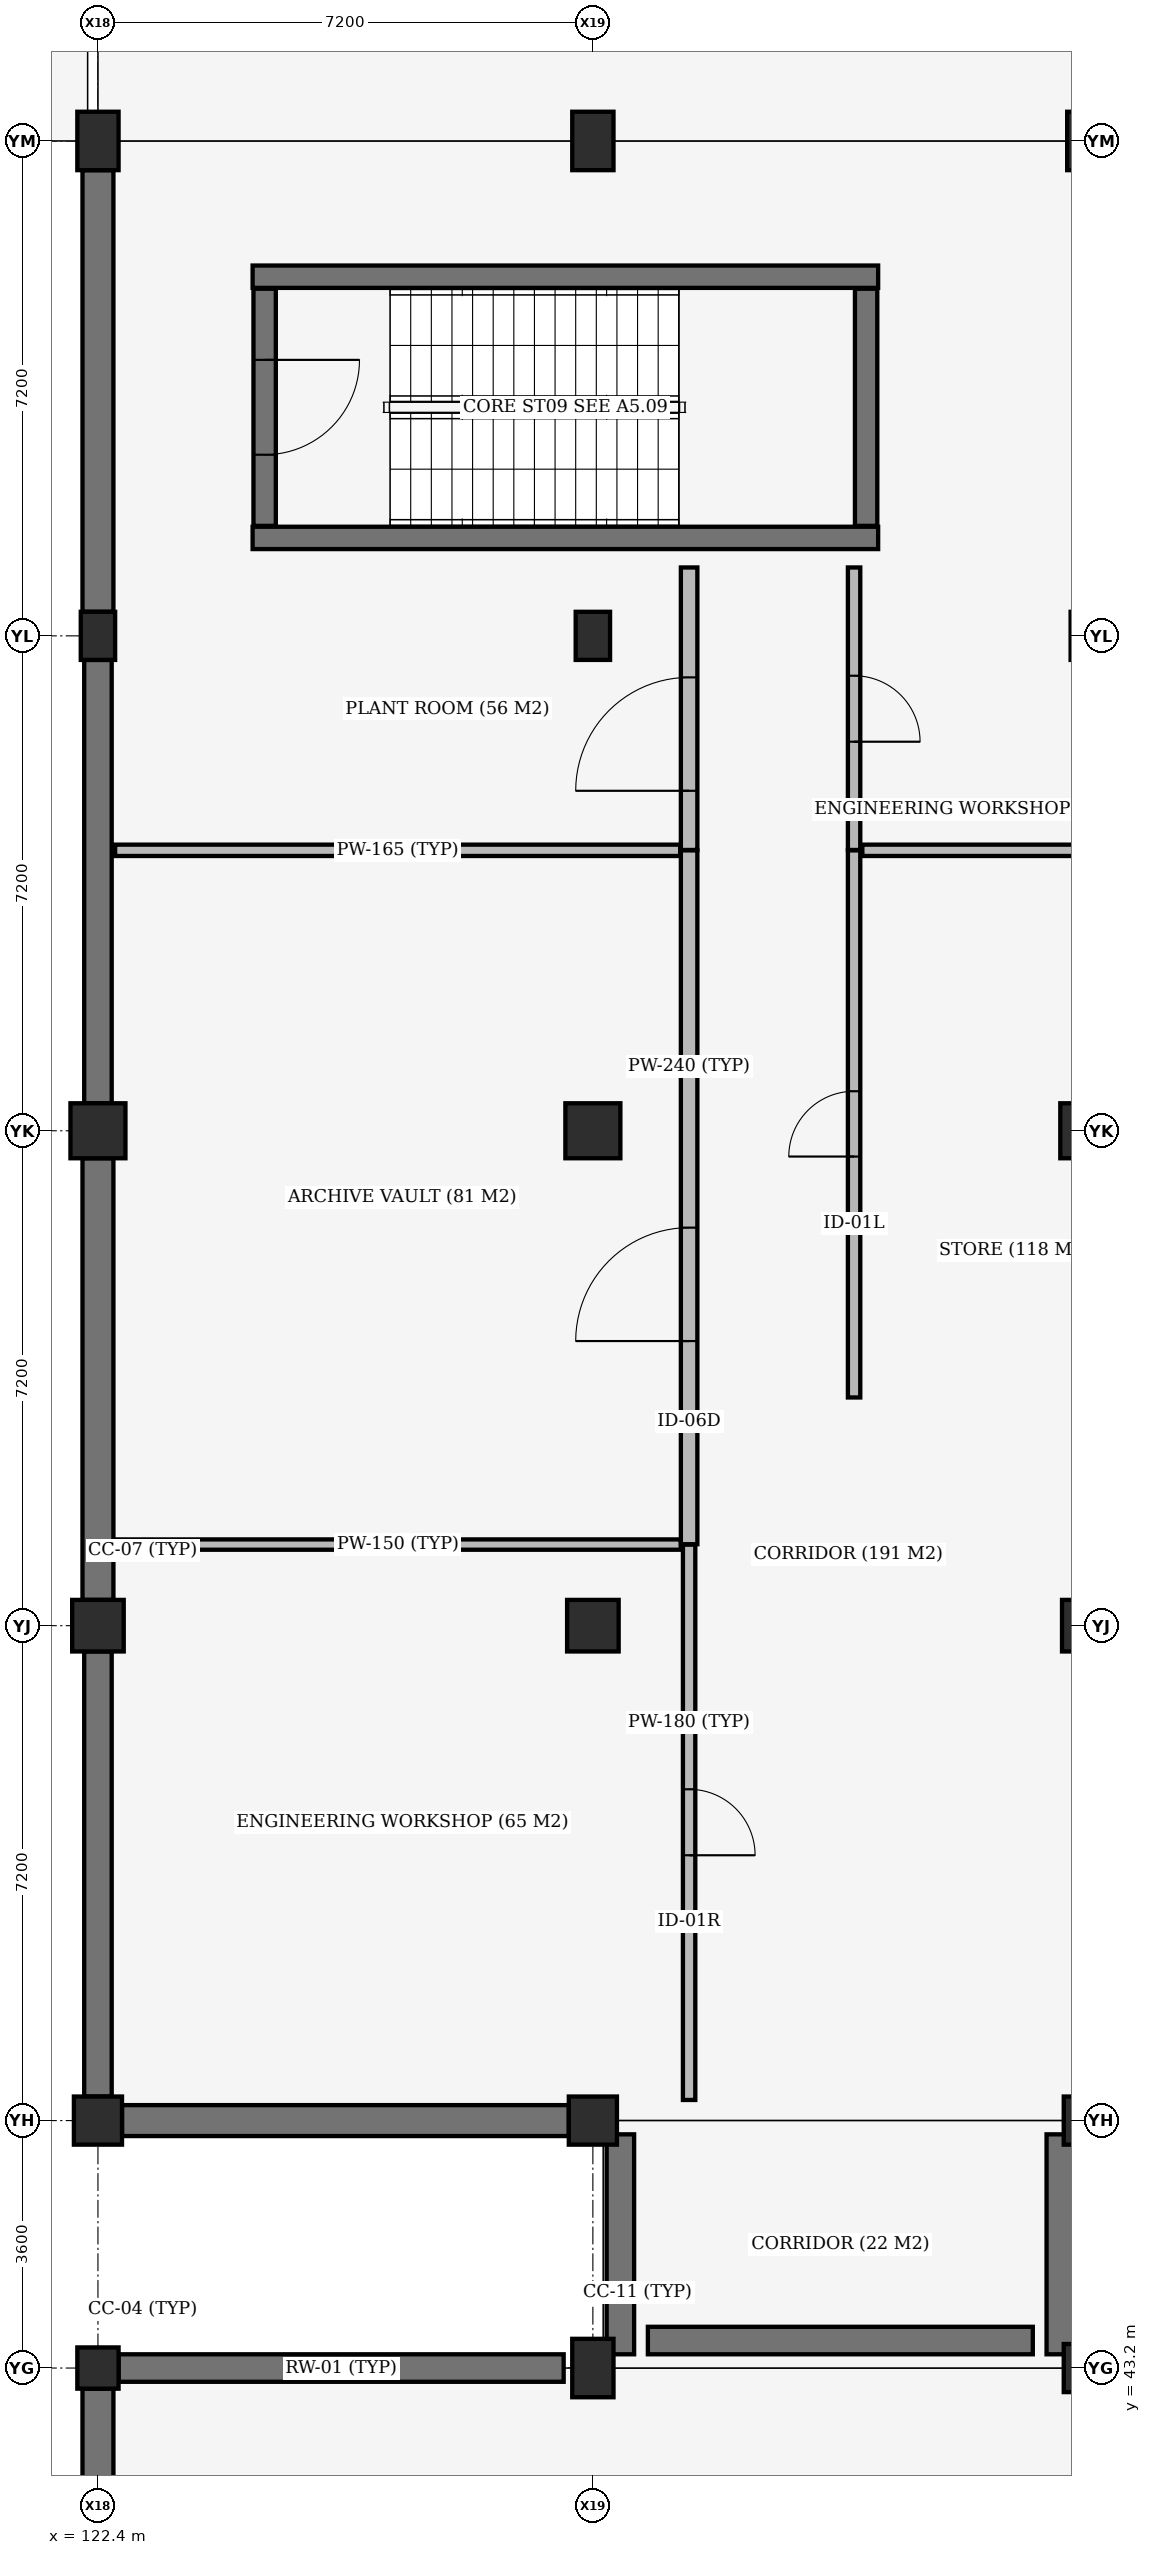
"""IFC4 building model, lengths in metres.
Left out: names, types, materials, properties, quantities, classifications, styles, units other than length and angle.
Written with IfcOpenShell. Run it as: python <this file> out.ifc"""

import sys

from ifc_helpers import new_model, si_unit, direction, frame, frame_2d, origin, origin_2d, place, context, subcontext, project, spatial, rectangle, extrude, element, fill, save


model = new_model("IFC4")
c1 = context("Model", 3, precision=1e-05, world=origin(), true_north=direction((0.0, 1.0)))
c2 = subcontext(c1, "Body", "Model", "MODEL_VIEW")
j1 = project(units=[si_unit("LENGTHUNIT", "METRE"), si_unit("PLANEANGLEUNIT", "RADIAN")], contexts=[c1])
p1 = place(None, origin())
s1 = spatial("IfcSite", under=j1, at=p1, CompositionType="ELEMENT")
p2 = place(p1, origin())
s2 = spatial("IfcBuilding", under=s1, at=p2, CompositionType="ELEMENT")
p3 = place(p2, frame((0.0, 0.0, -4.5)))
s3 = spatial("IfcBuildingStorey", under=s2, at=p3, CompositionType="ELEMENT", Elevation=-4.5)
p4 = place(p3, frame((122.4, 43.2, -0.42), z_axis=(0.0, 0.0, 1.0), x_axis=(1.0, 0.0, 0.0)))
e1 = element("IfcColumn", 1, at=p4, inside=s3, PredefinedType="COLUMN", context=c2, shape_type="SweptSolid", body=[
    extrude(rectangle(XDim=0.6, YDim=0.6, at=origin_2d()), origin(), (0.0, 0.0, 1.0), 4.6),
])
p5 = place(p3, frame((129.6, 43.2, -0.42), z_axis=(0.0, 0.0, 1.0), x_axis=(1.0, 0.0, 0.0)))
e2 = element("IfcColumn", 2, at=p5, inside=s3, PredefinedType="COLUMN", context=c2, shape_type="SweptSolid", body=[
    extrude(rectangle(XDim=0.6, YDim=0.85, at=origin_2d()), origin(), (0.0, 0.0, 1.0), 4.6),
])
for number, where, z_axis, x_axis in (
    (3, (136.8, 43.2, -0.42), (0.0, 0.0, 1.0), (1.0, 0.0, 0.0)),
    (4, (122.4, 46.8, -0.42), (0.0, 0.0, 1.0), (1.0, 0.0, 0.0)),
):
    element("IfcColumn", number, at=place(p3, frame(where, z_axis=z_axis, x_axis=x_axis)), inside=s3, PredefinedType="COLUMN", context=c2, shape_type="SweptSolid", body=[
        extrude(rectangle(XDim=0.7, YDim=0.7, at=origin_2d()), origin(), (0.0, 0.0, 1.0), 4.6),
    ])
p6 = place(p3, frame((122.4, 54.0, -0.42), z_axis=(0.0, 0.0, 1.0), x_axis=(1.0, 0.0, 0.0)))
e5 = element("IfcColumn", 5, at=p6, inside=s3, PredefinedType="COLUMN", context=c2, shape_type="SweptSolid", body=[
    extrude(rectangle(XDim=0.75, YDim=0.75, at=origin_2d()), origin(), (0.0, 0.0, 1.0), 4.6),
])
p7 = place(p3, frame((122.4, 61.2, -0.42), z_axis=(0.0, 0.0, 1.0), x_axis=(1.0, 0.0, 0.0)))
e6 = element("IfcColumn", 6, at=p7, inside=s3, PredefinedType="COLUMN", context=c2, shape_type="SweptSolid", body=[
    extrude(rectangle(XDim=0.8, YDim=0.8, at=origin_2d()), origin(), (0.0, 0.0, 1.0), 4.6),
])
p8 = place(p3, frame((122.4, 68.4, -0.42), z_axis=(0.0, 0.0, 1.0), x_axis=(1.0, 0.0, 0.0)))
e7 = element("IfcColumn", 7, at=p8, inside=s3, PredefinedType="COLUMN", context=c2, shape_type="SweptSolid", body=[
    extrude(rectangle(XDim=0.5, YDim=0.7, at=origin_2d()), origin(), (0.0, 0.0, 1.0), 4.6),
])
p9 = place(p3, frame((122.4, 75.6, -0.42), z_axis=(0.0, 0.0, 1.0), x_axis=(1.0, 0.0, 0.0)))
e8 = element("IfcColumn", 8, at=p9, inside=s3, PredefinedType="COLUMN", context=c2, shape_type="SweptSolid", body=[
    extrude(rectangle(XDim=0.6, YDim=0.85, at=origin_2d()), origin(), (0.0, 0.0, 1.0), 4.6),
])
p10 = place(p3, frame((129.6, 46.8, -0.42), z_axis=(0.0, 0.0, 1.0), x_axis=(1.0, 0.0, 0.0)))
e9 = element("IfcColumn", 9, at=p10, inside=s3, PredefinedType="COLUMN", context=c2, shape_type="SweptSolid", body=[
    extrude(rectangle(XDim=0.7, YDim=0.7, at=origin_2d()), origin(), (0.0, 0.0, 1.0), 4.6),
])
p11 = place(p3, frame((129.6, 54.0, -0.42), z_axis=(0.0, 0.0, 1.0), x_axis=(1.0, 0.0, 0.0)))
e10 = element("IfcColumn", 10, at=p11, inside=s3, PredefinedType="COLUMN", context=c2, shape_type="SweptSolid", body=[
    extrude(rectangle(XDim=0.75, YDim=0.75, at=origin_2d()), origin(), (0.0, 0.0, 1.0), 4.6),
])
p12 = place(p3, frame((129.6, 61.2, -0.42), z_axis=(0.0, 0.0, 1.0), x_axis=(1.0, 0.0, 0.0)))
e11 = element("IfcColumn", 11, at=p12, inside=s3, PredefinedType="COLUMN", context=c2, shape_type="SweptSolid", body=[
    extrude(rectangle(XDim=0.8, YDim=0.8, at=origin_2d()), origin(), (0.0, 0.0, 1.0), 4.6),
])
p13 = place(p3, frame((129.6, 68.4, -0.42), z_axis=(0.0, 0.0, 1.0), x_axis=(1.0, 0.0, 0.0)))
e12 = element("IfcColumn", 12, at=p13, inside=s3, PredefinedType="COLUMN", context=c2, shape_type="SweptSolid", body=[
    extrude(rectangle(XDim=0.5, YDim=0.7, at=origin_2d()), origin(), (0.0, 0.0, 1.0), 4.6),
])
p14 = place(p3, frame((129.6, 75.6, -0.42), z_axis=(0.0, 0.0, 1.0), x_axis=(1.0, 0.0, 0.0)))
e13 = element("IfcColumn", 13, at=p14, inside=s3, PredefinedType="COLUMN", context=c2, shape_type="SweptSolid", body=[
    extrude(rectangle(XDim=0.6, YDim=0.85, at=origin_2d()), origin(), (0.0, 0.0, 1.0), 4.6),
])
p15 = place(p3, frame((136.8, 46.8, -0.42), z_axis=(0.0, 0.0, 1.0), x_axis=(1.0, 0.0, 0.0)))
e14 = element("IfcColumn", 14, at=p15, inside=s3, PredefinedType="COLUMN", context=c2, shape_type="SweptSolid", body=[
    extrude(rectangle(XDim=0.7, YDim=0.7, at=origin_2d()), origin(), (0.0, 0.0, 1.0), 4.6),
])
p16 = place(p3, frame((136.8, 54.0, -0.42), z_axis=(0.0, 0.0, 1.0), x_axis=(1.0, 0.0, 0.0)))
e15 = element("IfcColumn", 15, at=p16, inside=s3, PredefinedType="COLUMN", context=c2, shape_type="SweptSolid", body=[
    extrude(rectangle(XDim=0.75, YDim=0.75, at=origin_2d()), origin(), (0.0, 0.0, 1.0), 4.6),
])
p17 = place(p3, frame((136.8, 61.2, -0.42), z_axis=(0.0, 0.0, 1.0), x_axis=(1.0, 0.0, 0.0)))
e16 = element("IfcColumn", 16, at=p17, inside=s3, PredefinedType="COLUMN", context=c2, shape_type="SweptSolid", body=[
    extrude(rectangle(XDim=0.8, YDim=0.8, at=origin_2d()), origin(), (0.0, 0.0, 1.0), 4.6),
])
p18 = place(p3, frame((136.8, 75.6, -0.42), z_axis=(0.0, 0.0, 1.0), x_axis=(1.0, 0.0, 0.0)))
e17 = element("IfcColumn", 17, at=p18, inside=s3, PredefinedType="COLUMN", context=c2, shape_type="SweptSolid", body=[
    extrude(rectangle(XDim=0.6, YDim=0.85, at=origin_2d()), origin(), (0.0, 0.0, 1.0), 4.6),
])
for number, where, z_axis, x_axis in (
    (18, (124.65, 69.825, 0.0), (0.0, 0.0, 1.0), (1.0, 0.0, 0.0)),
    (19, (133.75, 73.625, 0.0), (0.0, 0.0, 1.0), (-1.0, 0.0, 0.0)),
):
    element("IfcWall", number, at=place(p3, frame(where, z_axis=z_axis, x_axis=x_axis)), inside=s3, PredefinedType="SHEAR", context=c2, shape_type="SweptSolid", body=[
        extrude(rectangle(XDim=9.1, YDim=0.325, at=frame_2d((4.55, 0.0))), origin(), (0.0, 0.0, 1.0), 4.18),
    ])
p19 = place(p3, frame((133.575, 70.0, 0.0), z_axis=(0.0, 0.0, 1.0), x_axis=(0.0, 1.0, 0.0)))
e20 = element("IfcWall", 20, at=p19, inside=s3, PredefinedType="SHEAR", context=c2, shape_type="SweptSolid", body=[
    extrude(rectangle(XDim=3.45, YDim=0.325, at=frame_2d((1.725, 0.0))), origin(), (0.0, 0.0, 1.0), 4.18),
])
p20 = place(p3, frame((122.7, 43.2, 0.0), z_axis=(0.0, 0.0, 1.0), x_axis=(1.0, 0.0, 0.0)))
e21 = element("IfcWall", 21, at=p20, inside=s3, PredefinedType="USERDEFINED", context=c2, shape_type="SweptSolid", body=[
    extrude(rectangle(XDim=6.475, YDim=0.4, at=frame_2d((3.238, 0.0))), origin(), (0.0, 0.0, 1.0), 4.18),
])
p21 = place(p3, frame((122.4, 36.275, 0.0), z_axis=(0.0, 0.0, 1.0), x_axis=(0.0, 1.0, 0.0)))
e22 = element("IfcWall", 22, at=p21, inside=s3, PredefinedType="USERDEFINED", context=c2, shape_type="SweptSolid", body=[
    extrude(rectangle(XDim=6.625, YDim=0.45, at=frame_2d((3.312, 0.0))), origin(), (0.0, 0.0, 1.0), 4.18),
])
p22 = place(p3, frame((122.75, 46.8, 0.0), z_axis=(0.0, 0.0, 1.0), x_axis=(1.0, 0.0, 0.0)))
e23 = element("IfcWall", 23, at=p22, inside=s3, PredefinedType="USERDEFINED", context=c2, shape_type="SweptSolid", body=[
    extrude(rectangle(XDim=6.5, YDim=0.45, at=frame_2d((3.25, 0.0))), origin(), (0.0, 0.0, 1.0), 4.18),
])
p23 = place(p3, frame((122.4, 47.15, 0.0), z_axis=(0.0, 0.0, 1.0), x_axis=(0.0, 1.0, 0.0)))
e24 = element("IfcWall", 24, at=p23, inside=s3, PredefinedType="USERDEFINED", context=c2, shape_type="SweptSolid", body=[
    extrude(rectangle(XDim=6.475, YDim=0.4, at=frame_2d((3.238, 0.0))), origin(), (0.0, 0.0, 1.0), 4.18),
])
p24 = place(p3, frame((122.4, 54.375, 0.0), z_axis=(0.0, 0.0, 1.0), x_axis=(0.0, 1.0, 0.0)))
e25 = element("IfcWall", 25, at=p24, inside=s3, PredefinedType="USERDEFINED", context=c2, shape_type="SweptSolid", body=[
    extrude(rectangle(XDim=6.425, YDim=0.45, at=frame_2d((3.212, 0.0))), origin(), (0.0, 0.0, 1.0), 4.18),
])
p25 = place(p3, frame((122.4, 61.6, 0.0), z_axis=(0.0, 0.0, 1.0), x_axis=(0.0, 1.0, 0.0)))
e26 = element("IfcWall", 26, at=p25, inside=s3, PredefinedType="USERDEFINED", context=c2, shape_type="SweptSolid", body=[
    extrude(rectangle(XDim=6.45, YDim=0.4, at=frame_2d((3.225, 0.0))), origin(), (0.0, 0.0, 1.0), 4.18),
])
p26 = place(p3, frame((122.4, 68.75, 0.0), z_axis=(0.0, 0.0, 1.0), x_axis=(0.0, 1.0, 0.0)))
e27 = element("IfcWall", 27, at=p26, inside=s3, PredefinedType="USERDEFINED", context=c2, shape_type="SweptSolid", body=[
    extrude(rectangle(XDim=6.425, YDim=0.45, at=frame_2d((3.212, 0.0))), origin(), (0.0, 0.0, 1.0), 4.18),
])
for number, where, z_axis, x_axis in (
    (28, (130.0, 43.4, 0.0), (0.0, 0.0, 1.0), (0.0, 1.0, 0.0)),
    (29, (136.4, 43.4, 0.0), (0.0, 0.0, 1.0), (0.0, 1.0, 0.0)),
):
    element("IfcWall", number, at=place(p3, frame(where, z_axis=z_axis, x_axis=x_axis)), inside=s3, PredefinedType="USERDEFINED", context=c2, shape_type="SweptSolid", body=[
        extrude(rectangle(XDim=3.2, YDim=0.4, at=frame_2d((1.6, 0.0))), origin(), (0.0, 0.0, 1.0), 4.235),
    ])
p27 = place(p3, frame((130.4, 43.6, 0.0), z_axis=(0.0, 0.0, 1.0), x_axis=(1.0, 0.0, 0.0)))
e30 = element("IfcWall", 30, at=p27, inside=s3, PredefinedType="USERDEFINED", context=c2, shape_type="SweptSolid", body=[
    extrude(rectangle(XDim=5.6, YDim=0.4, at=frame_2d((2.8, 0.0))), origin(), (0.0, 0.0, 1.0), 4.235),
])
p28 = place(p3, frame((124.825, 73.45, 0.0), z_axis=(0.0, 0.0, 1.0), x_axis=(0.0, -1.0, 0.0)))
e31 = element("IfcWall", 31, at=p28, inside=s3, PredefinedType="SHEAR", context=c2, shape_type="SweptSolid", body=[
    extrude(rectangle(XDim=3.45, YDim=0.325, at=frame_2d((1.725, 0.0))), origin(), (0.0, 0.0, 1.0), 4.18),
])
p29 = place(p28, frame((1.035, 0.0, 0.0)))
e32 = element("IfcOpeningElement", 32, at=p29, cuts=e31, PredefinedType="OPENING", context=c2, shape_type="SweptSolid", body=[
    extrude(rectangle(XDim=1.38, YDim=2.2, at=frame_2d((0.69, 1.1))), frame((0.0, 0.172, 0.0), z_axis=(0.0, -1.0, 0.0), x_axis=(1.0, 0.0, 0.0)), (0.0, 0.0, 1.0), 0.345),
])
p30 = place(p3, frame((131.0, 47.1, 0.0), z_axis=(0.0, 0.0, 1.0), x_axis=(0.0, 1.0, 0.0)))
e33 = element("IfcWall", 33, at=p30, inside=s3, PredefinedType="PARTITIONING", context=c2, shape_type="SweptSolid", body=[
    extrude(rectangle(XDim=8.08, YDim=0.18, at=frame_2d((4.04, 0.0))), origin(), (0.0, 0.0, 1.0), 3.38),
])
p31 = place(p30, frame((3.56, 0.0, 0.0)))
e34 = element("IfcOpeningElement", 34, at=p31, cuts=e33, PredefinedType="OPENING", context=c2, shape_type="SweptSolid", body=[
    extrude(rectangle(XDim=0.96, YDim=2.15, at=frame_2d((0.48, 1.075))), frame((0.0, 0.1, 0.0), z_axis=(0.0, -1.0, 0.0), x_axis=(1.0, 0.0, 0.0)), (0.0, 0.0, 1.0), 0.2),
])
p32 = place(p3, frame((122.65, 55.18, 0.0), z_axis=(0.0, 0.0, 1.0), x_axis=(1.0, 0.0, 0.0)))
e35 = element("IfcWall", 35, at=p32, inside=s3, PredefinedType="PARTITIONING", context=c2, shape_type="SweptSolid", body=[
    extrude(rectangle(XDim=8.23, YDim=0.15, at=frame_2d((4.115, 0.0))), origin(), (0.0, 0.0, 1.0), 3.48),
])
p33 = place(p3, frame((131.0, 55.185, 0.0), z_axis=(0.0, 0.0, 1.0), x_axis=(0.0, 1.0, 0.0)))
e36 = element("IfcWall", 36, at=p33, inside=s3, PredefinedType="STANDARD", context=c2, shape_type="SweptSolid", body=[
    extrude(rectangle(XDim=10.095, YDim=0.24, at=frame_2d((5.047, 0.0))), origin(), (0.0, 0.0, 1.0), 3.53),
])
p34 = place(p33, frame((2.956, 0.0, 0.0)))
e37 = element("IfcOpeningElement", 37, at=p34, cuts=e36, PredefinedType="OPENING", context=c2, shape_type="SweptSolid", body=[
    extrude(rectangle(XDim=1.65, YDim=2.25, at=frame_2d((0.825, 1.125))), frame((0.0, 0.13, 0.0), z_axis=(0.0, -1.0, 0.0), x_axis=(1.0, 0.0, 0.0)), (0.0, 0.0, 1.0), 0.26),
])
p35 = place(p3, frame((122.65, 65.28, 0.0), z_axis=(0.0, 0.0, 1.0), x_axis=(1.0, 0.0, 0.0)))
e38 = element("IfcWall", 38, at=p35, inside=s3, PredefinedType="PARTITIONING", context=c2, shape_type="SweptSolid", body=[
    extrude(rectangle(XDim=8.22, YDim=0.165, at=frame_2d((4.11, 0.0))), origin(), (0.0, 0.0, 1.0), 3.43),
])
p36 = place(p3, frame((131.0, 65.285, 0.0), z_axis=(0.0, 0.0, 1.0), x_axis=(0.0, 1.0, 0.0)))
e39 = element("IfcWall", 39, at=p36, inside=s3, PredefinedType="STANDARD", context=c2, shape_type="SweptSolid", body=[
    extrude(rectangle(XDim=4.11, YDim=0.24, at=frame_2d((2.055, 0.0))), origin(), (0.0, 0.0, 1.0), 3.43),
])
p37 = place(p36, frame((0.861, 0.0, 0.0)))
e40 = element("IfcOpeningElement", 40, at=p37, cuts=e39, PredefinedType="OPENING", context=c2, shape_type="SweptSolid", body=[
    extrude(rectangle(XDim=1.65, YDim=2.25, at=frame_2d((0.825, 1.125))), frame((0.0, 0.13, 0.0), z_axis=(0.0, -1.0, 0.0), x_axis=(1.0, 0.0, 0.0)), (0.0, 0.0, 1.0), 0.26),
])
p38 = place(p3, frame((133.4, 57.32, 0.0), z_axis=(0.0, 0.0, 1.0), x_axis=(0.0, 1.0, 0.0)))
e41 = element("IfcWall", 41, at=p38, inside=s3, PredefinedType="PARTITIONING", context=c2, shape_type="SweptSolid", body=[
    extrude(rectangle(XDim=7.96, YDim=0.18, at=frame_2d((3.98, 0.0))), origin(), (0.0, 0.0, 1.0), 3.53),
])
p39 = place(p38, frame((3.505, 0.0, 0.0)))
e42 = element("IfcOpeningElement", 42, at=p39, cuts=e41, PredefinedType="OPENING", context=c2, shape_type="SweptSolid", body=[
    extrude(rectangle(XDim=0.95, YDim=2.15, at=frame_2d((0.475, 1.075))), frame((0.0, 0.1, 0.0), z_axis=(0.0, -1.0, 0.0), x_axis=(1.0, 0.0, 0.0)), (0.0, 0.0, 1.0), 0.2),
])
p40 = place(p3, frame((133.52, 65.28, 0.0), z_axis=(0.0, 0.0, 1.0), x_axis=(1.0, 0.0, 0.0)))
e43 = element("IfcWall", 43, at=p40, inside=s3, PredefinedType="PARTITIONING", context=c2, shape_type="SweptSolid", body=[
    extrude(rectangle(XDim=26.16, YDim=0.165, at=frame_2d((13.08, 0.0))), origin(), (0.0, 0.0, 1.0), 3.53),
])
p41 = place(p3, frame((133.4, 65.285, 0.0), z_axis=(0.0, 0.0, 1.0), x_axis=(0.0, 1.0, 0.0)))
e44 = element("IfcWall", 44, at=p41, inside=s3, PredefinedType="PARTITIONING", context=c2, shape_type="SweptSolid", body=[
    extrude(rectangle(XDim=4.11, YDim=0.18, at=frame_2d((2.055, 0.0))), origin(), (0.0, 0.0, 1.0), 3.43),
])
p42 = place(p41, frame((1.575, 0.0, 0.0)))
e45 = element("IfcOpeningElement", 45, at=p42, cuts=e44, PredefinedType="OPENING", context=c2, shape_type="SweptSolid", body=[
    extrude(rectangle(XDim=0.96, YDim=2.15, at=frame_2d((0.48, 1.075))), frame((0.0, 0.1, 0.0), z_axis=(0.0, -1.0, 0.0), x_axis=(1.0, 0.0, 0.0)), (0.0, 0.0, 1.0), 0.2),
])
p43 = place(p29, origin())
e46 = element("IfcDoor", 46, at=p43, inside=s3, OperationType="DOUBLE_DOOR_SINGLE_SWING", PredefinedType="DOOR", context=c2, shape_type="SweptSolid", body=[
    extrude(rectangle(XDim=1.38, YDim=2.2, at=frame_2d((0.69, 1.1))), frame((0.0, 0.025, 0.0), z_axis=(0.0, -1.0, 0.0), x_axis=(1.0, 0.0, 0.0)), (0.0, 0.0, 1.0), 0.05),
])
fill(e32, e46)
p44 = place(p31, origin())
e47 = element("IfcDoor", 47, at=p44, inside=s3, OperationType="SINGLE_SWING_RIGHT", PredefinedType="DOOR", context=c2, shape_type="SweptSolid", body=[
    extrude(rectangle(XDim=0.96, YDim=2.15, at=frame_2d((0.48, 1.075))), frame((0.0, 0.025, 0.0), z_axis=(0.0, -1.0, 0.0), x_axis=(1.0, 0.0, 0.0)), (0.0, 0.0, 1.0), 0.05),
])
fill(e34, e47)
p45 = place(p34, origin())
e48 = element("IfcDoor", 48, at=p45, inside=s3, OperationType="DOUBLE_DOOR_SINGLE_SWING", PredefinedType="DOOR", context=c2, shape_type="SweptSolid", body=[
    extrude(rectangle(XDim=1.65, YDim=2.25, at=frame_2d((0.825, 1.125))), frame((0.0, 0.025, 0.0), z_axis=(0.0, -1.0, 0.0), x_axis=(1.0, 0.0, 0.0)), (0.0, 0.0, 1.0), 0.05),
])
fill(e37, e48)
p46 = place(p37, origin())
e49 = element("IfcDoor", 49, at=p46, inside=s3, OperationType="DOUBLE_DOOR_SINGLE_SWING", PredefinedType="DOOR", context=c2, shape_type="SweptSolid", body=[
    extrude(rectangle(XDim=1.65, YDim=2.25, at=frame_2d((0.825, 1.125))), frame((0.0, 0.025, 0.0), z_axis=(0.0, -1.0, 0.0), x_axis=(1.0, 0.0, 0.0)), (0.0, 0.0, 1.0), 0.05),
])
fill(e40, e49)
p47 = place(p39, origin())
e50 = element("IfcDoor", 50, at=p47, inside=s3, OperationType="SINGLE_SWING_LEFT", PredefinedType="DOOR", context=c2, shape_type="SweptSolid", body=[
    extrude(rectangle(XDim=0.95, YDim=2.15, at=frame_2d((0.475, 1.075))), frame((0.0, 0.025, 0.0), z_axis=(0.0, -1.0, 0.0), x_axis=(1.0, 0.0, 0.0)), (0.0, 0.0, 1.0), 0.05),
])
fill(e42, e50)
p48 = place(p42, origin())
e51 = element("IfcDoor", 51, at=p48, inside=s3, OperationType="SINGLE_SWING_RIGHT", PredefinedType="DOOR", context=c2, shape_type="SweptSolid", body=[
    extrude(rectangle(XDim=0.96, YDim=2.15, at=frame_2d((0.48, 1.075))), frame((0.0, 0.025, 0.0), z_axis=(0.0, -1.0, 0.0), x_axis=(1.0, 0.0, 0.0)), (0.0, 0.0, 1.0), 0.05),
])
fill(e45, e51)
save(model, sys.argv[1])
